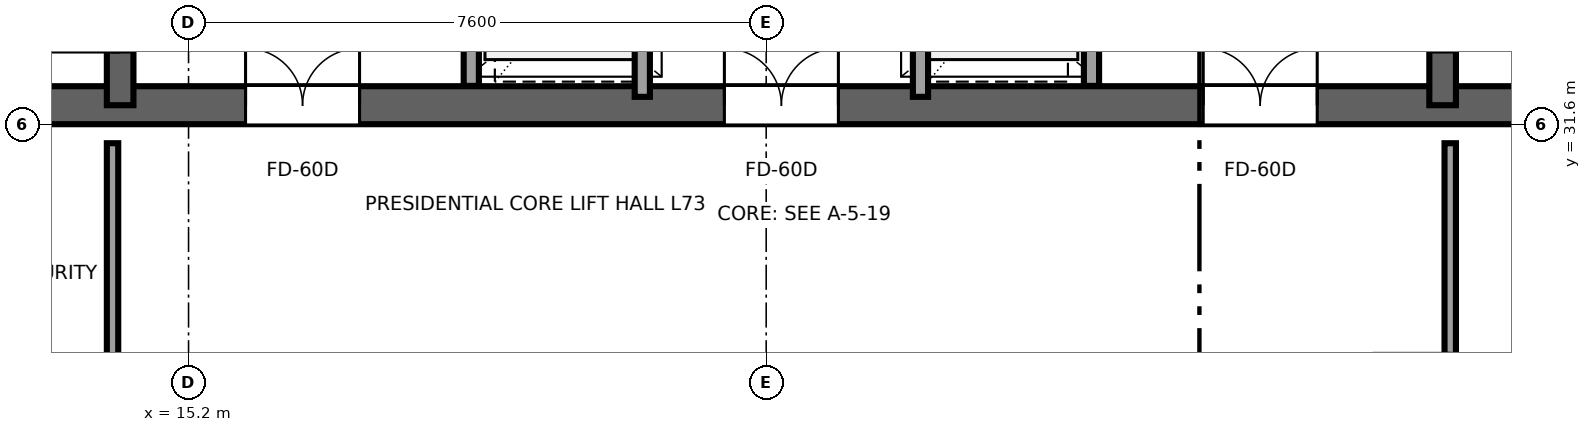
"""IFC4 building model, lengths in metres.
Left out: names, types, materials, properties, quantities, classifications, styles, units other than length and angle.
Written with IfcOpenShell. Run it as: python <this file> out.ifc"""

import sys

from ifc_helpers import new_model, si_unit, direction, frame, frame_2d, origin, place, context, subcontext, project, spatial, rectangle, extrude, source, transform, mapped, element, fill, save


model = new_model("IFC4")
c1 = context("Model", 3, precision=1e-05, world=origin(), true_north=direction((0.0, 1.0)))
c2 = subcontext(c1, "Body", "Model", "MODEL_VIEW")
j1 = project(units=[si_unit("LENGTHUNIT", "METRE"), si_unit("PLANEANGLEUNIT", "RADIAN")], contexts=[c1])
p1 = place(None, origin())
s1 = spatial("IfcSite", under=j1, at=p1, CompositionType="ELEMENT")
p2 = place(p1, origin())
s2 = spatial("IfcBuilding", under=s1, at=p2, CompositionType="ELEMENT")
p3 = place(p2, frame((0.0, 0.0, 275.05)))
s3 = spatial("IfcBuildingStorey", under=s2, at=p3, CompositionType="ELEMENT", Elevation=275.05)
p4 = place(p3, frame((10.0, 31.85, 0.0), z_axis=(0.0, 0.0, 1.0), x_axis=(1.0, 0.0, 0.0)))
e1 = element("IfcWall", 1, at=p4, inside=s3, PredefinedType="SHEAR", context=c2, shape_type="SweptSolid", body=[
    extrude(rectangle(XDim=26.0, YDim=0.5, at=frame_2d((13.0, 0.0))), origin(), (0.0, 0.0, 1.0), 3.55),
])
p5 = place(p4, frame((7.45, 0.0, 0.0), z_axis=(0.0, 0.0, 1.0), x_axis=(-1.0, 0.0, 0.0)))
e2 = element("IfcOpeningElement", 2, at=p5, cuts=e1, PredefinedType="OPENING", context=c2, shape_type="SweptSolid", body=[
    extrude(rectangle(XDim=1.5, YDim=2.04, at=frame_2d((0.75, 1.02))), frame((0.0, 0.26, 0.0), z_axis=(0.0, -1.0, 0.0), x_axis=(1.0, 0.0, 0.0)), (0.0, 0.0, 1.0), 0.52),
])
p6 = place(p4, frame((13.75, 0.0, 0.0), z_axis=(0.0, 0.0, 1.0), x_axis=(-1.0, 0.0, 0.0)))
e3 = element("IfcOpeningElement", 3, at=p6, cuts=e1, PredefinedType="OPENING", context=c2, shape_type="SweptSolid", body=[
    extrude(rectangle(XDim=1.5, YDim=2.04, at=frame_2d((0.75, 1.02))), frame((0.0, 0.26, 0.0), z_axis=(0.0, -1.0, 0.0), x_axis=(1.0, 0.0, 0.0)), (0.0, 0.0, 1.0), 0.52),
])
p7 = place(p4, frame((20.05, 0.0, 0.0), z_axis=(0.0, 0.0, 1.0), x_axis=(-1.0, 0.0, 0.0)))
e4 = element("IfcOpeningElement", 4, at=p7, cuts=e1, PredefinedType="OPENING", context=c2, shape_type="SweptSolid", body=[
    extrude(rectangle(XDim=1.5, YDim=2.04, at=frame_2d((0.75, 1.02))), frame((0.0, 0.26, 0.0), z_axis=(0.0, -1.0, 0.0), x_axis=(1.0, 0.0, 0.0)), (0.0, 0.0, 1.0), 0.52),
])
p8 = place(p3, frame((14.3, 31.85, 0.0), z_axis=(0.0, 0.0, 1.0), x_axis=(0.0, 1.0, 0.0)))
e5 = element("IfcWall", 5, at=p8, inside=s3, PredefinedType="SHEAR", context=c2, shape_type="SweptSolid", body=[
    extrude(rectangle(XDim=13.1, YDim=0.35, at=frame_2d((6.55, 0.0))), origin(), (0.0, 0.0, 1.0), 3.55),
])
p9 = place(p8, frame((0.7, 0.0, 0.0)))
e6 = element("IfcOpeningElement", 6, at=p9, cuts=e5, PredefinedType="OPENING", context=c2, shape_type="SweptSolid", body=[
    extrude(rectangle(XDim=1.1, YDim=2.12, at=frame_2d((0.55, 1.06))), frame((0.0, 0.185, 0.0), z_axis=(0.0, -1.0, 0.0), x_axis=(1.0, 0.0, 0.0)), (0.0, 0.0, 1.0), 0.37),
])
p10 = place(p3, frame((31.7, 31.85, 0.0), z_axis=(0.0, 0.0, 1.0), x_axis=(0.0, 1.0, 0.0)))
e7 = element("IfcWall", 7, at=p10, inside=s3, PredefinedType="SHEAR", context=c2, shape_type="SweptSolid", body=[
    extrude(rectangle(XDim=13.1, YDim=0.35, at=frame_2d((6.55, 0.0))), origin(), (0.0, 0.0, 1.0), 3.55),
])
p11 = place(p10, frame((1.8, 0.0, 0.0), z_axis=(0.0, 0.0, 1.0), x_axis=(-1.0, 0.0, 0.0)))
e8 = element("IfcOpeningElement", 8, at=p11, cuts=e7, PredefinedType="OPENING", context=c2, shape_type="SweptSolid", body=[
    extrude(rectangle(XDim=1.1, YDim=2.12, at=frame_2d((0.55, 1.06))), frame((0.0, 0.185, 0.0), z_axis=(0.0, -1.0, 0.0), x_axis=(1.0, 0.0, 0.0)), (0.0, 0.0, 1.0), 0.37),
])
for number, where, z_axis, x_axis in (
    (9, (18.92, 32.104, 0.0), (0.0, 0.0, 1.0), (0.0, 1.0, 0.0)),
    (10, (27.08, 32.104, 0.0), (0.0, 0.0, 1.0), (0.0, 1.0, 0.0)),
):
    element("IfcWall", number, at=place(p3, frame(where, z_axis=z_axis, x_axis=x_axis)), inside=s3, PredefinedType="SOLIDWALL", context=c2, shape_type="SweptSolid", body=[
        extrude(rectangle(XDim=4.046, YDim=0.2, at=frame_2d((2.023, 0.0))), origin(), (0.0, 0.0, 1.0), 3.33),
    ])
p12 = place(p3, frame((21.17, 31.96, 0.0), z_axis=(0.0, 0.0, 1.0), x_axis=(0.0, 1.0, 0.0)))
e11 = element("IfcWall", 11, at=p12, inside=s3, PredefinedType="SOLIDWALL", context=c2, shape_type="SweptSolid", body=[
    extrude(rectangle(XDim=5.08, YDim=0.2, at=frame_2d((2.54, 0.0))), origin(), (0.0, 0.0, 1.0), 3.33),
])
p13 = place(p12, frame((0.74, 0.0, 0.0)))
e12 = element("IfcOpeningElement", 12, at=p13, cuts=e11, PredefinedType="OPENING", context=c2, shape_type="SweptSolid", body=[
    extrude(rectangle(XDim=1.1, YDim=2.12, at=frame_2d((0.55, 1.06))), frame((0.0, 0.11, 0.0), z_axis=(0.0, -1.0, 0.0), x_axis=(1.0, 0.0, 0.0)), (0.0, 0.0, 1.0), 0.22),
])
p14 = place(p12, frame((3.24, 0.0, 0.0)))
e13 = element("IfcOpeningElement", 13, at=p14, cuts=e11, PredefinedType="OPENING", context=c2, shape_type="SweptSolid", body=[
    extrude(rectangle(XDim=1.1, YDim=2.12, at=frame_2d((0.55, 1.06))), frame((0.0, 0.11, 0.0), z_axis=(0.0, -1.0, 0.0), x_axis=(1.0, 0.0, 0.0)), (0.0, 0.0, 1.0), 0.22),
])
p15 = place(p3, frame((24.83, 31.96, 0.0), z_axis=(0.0, 0.0, 1.0), x_axis=(0.0, 1.0, 0.0)))
e14 = element("IfcWall", 14, at=p15, inside=s3, PredefinedType="SOLIDWALL", context=c2, shape_type="SweptSolid", body=[
    extrude(rectangle(XDim=5.08, YDim=0.2, at=frame_2d((2.54, 0.0))), origin(), (0.0, 0.0, 1.0), 3.33),
])
p16 = place(p15, frame((0.74, 0.0, 0.0)))
e15 = element("IfcOpeningElement", 15, at=p16, cuts=e14, PredefinedType="OPENING", context=c2, shape_type="SweptSolid", body=[
    extrude(rectangle(XDim=1.1, YDim=2.12, at=frame_2d((0.55, 1.06))), frame((0.0, 0.11, 0.0), z_axis=(0.0, -1.0, 0.0), x_axis=(1.0, 0.0, 0.0)), (0.0, 0.0, 1.0), 0.22),
])
p17 = place(p15, frame((3.24, 0.0, 0.0)))
e16 = element("IfcOpeningElement", 16, at=p17, cuts=e14, PredefinedType="OPENING", context=c2, shape_type="SweptSolid", body=[
    extrude(rectangle(XDim=1.1, YDim=2.12, at=frame_2d((0.55, 1.06))), frame((0.0, 0.11, 0.0), z_axis=(0.0, -1.0, 0.0), x_axis=(1.0, 0.0, 0.0)), (0.0, 0.0, 1.0), 0.22),
])
p18 = place(p3, frame((14.2, 24.8, 0.0), z_axis=(0.0, 0.0, 1.0), x_axis=(0.0, 1.0, 0.0)))
e17 = element("IfcWall", 17, at=p18, inside=s3, PredefinedType="PARTITIONING", context=c2, shape_type="SweptSolid", body=[
    extrude(rectangle(XDim=6.55, YDim=0.15, at=frame_2d((3.275, 0.0))), origin(), (0.0, 0.0, 1.0), 3.33),
])
p19 = place(p3, frame((31.8, 24.8, 0.0), z_axis=(0.0, 0.0, 1.0), x_axis=(0.0, 1.0, 0.0)))
e18 = element("IfcWall", 18, at=p19, inside=s3, PredefinedType="PARTITIONING", context=c2, shape_type="SweptSolid", body=[
    extrude(rectangle(XDim=6.55, YDim=0.15, at=frame_2d((3.275, 0.0))), origin(), (0.0, 0.0, 1.0), 3.33),
])
p20 = place(p19, frame((2.765, 0.0, 0.0)))
e19 = element("IfcOpeningElement", 19, at=p20, cuts=e18, PredefinedType="OPENING", context=c2, shape_type="SweptSolid", body=[
    extrude(rectangle(XDim=1.02, YDim=2.03, at=frame_2d((0.51, 1.015))), frame((0.0, 0.085, 0.0), z_axis=(0.0, -1.0, 0.0), x_axis=(1.0, 0.0, 0.0)), (0.0, 0.0, 1.0), 0.17),
])
m1 = source(origin(), c2, "Body", "SweptSolid", [
    extrude(rectangle(XDim=1.5, YDim=2.04, at=frame_2d((0.75, 1.02))), frame((0.0, 0.025, 0.0), z_axis=(0.0, -1.0, 0.0), x_axis=(1.0, 0.0, 0.0)), (0.0, 0.0, 1.0), 0.05),
])
p21 = place(p5, origin())
e20 = element("IfcDoor", 20, at=p21, inside=s3, OperationType="DOUBLE_DOOR_SINGLE_SWING", PredefinedType="DOOR", context=c2, shape_type="MappedRepresentation", body=[
    mapped(m1, transform((0.0, 0.0, 0.0), x_axis=(1.0, 0.0, 0.0), y_axis=(0.0, 1.0, 0.0), z_axis=(0.0, 0.0, 1.0), scale=1.0)),
])
fill(e2, e20)
p22 = place(p6, origin())
e21 = element("IfcDoor", 21, at=p22, inside=s3, OperationType="DOUBLE_DOOR_SINGLE_SWING", PredefinedType="DOOR", context=c2, shape_type="MappedRepresentation", body=[
    mapped(m1, transform((0.0, 0.0, 0.0), x_axis=(1.0, 0.0, 0.0), y_axis=(0.0, 1.0, 0.0), z_axis=(0.0, 0.0, 1.0), scale=1.0)),
])
fill(e3, e21)
p23 = place(p7, origin())
e22 = element("IfcDoor", 22, at=p23, inside=s3, OperationType="DOUBLE_DOOR_SINGLE_SWING", PredefinedType="DOOR", context=c2, shape_type="MappedRepresentation", body=[
    mapped(m1, transform((0.0, 0.0, 0.0), x_axis=(1.0, 0.0, 0.0), y_axis=(0.0, 1.0, 0.0), z_axis=(0.0, 0.0, 1.0), scale=1.0)),
])
fill(e4, e22)
save(model, sys.argv[1])
